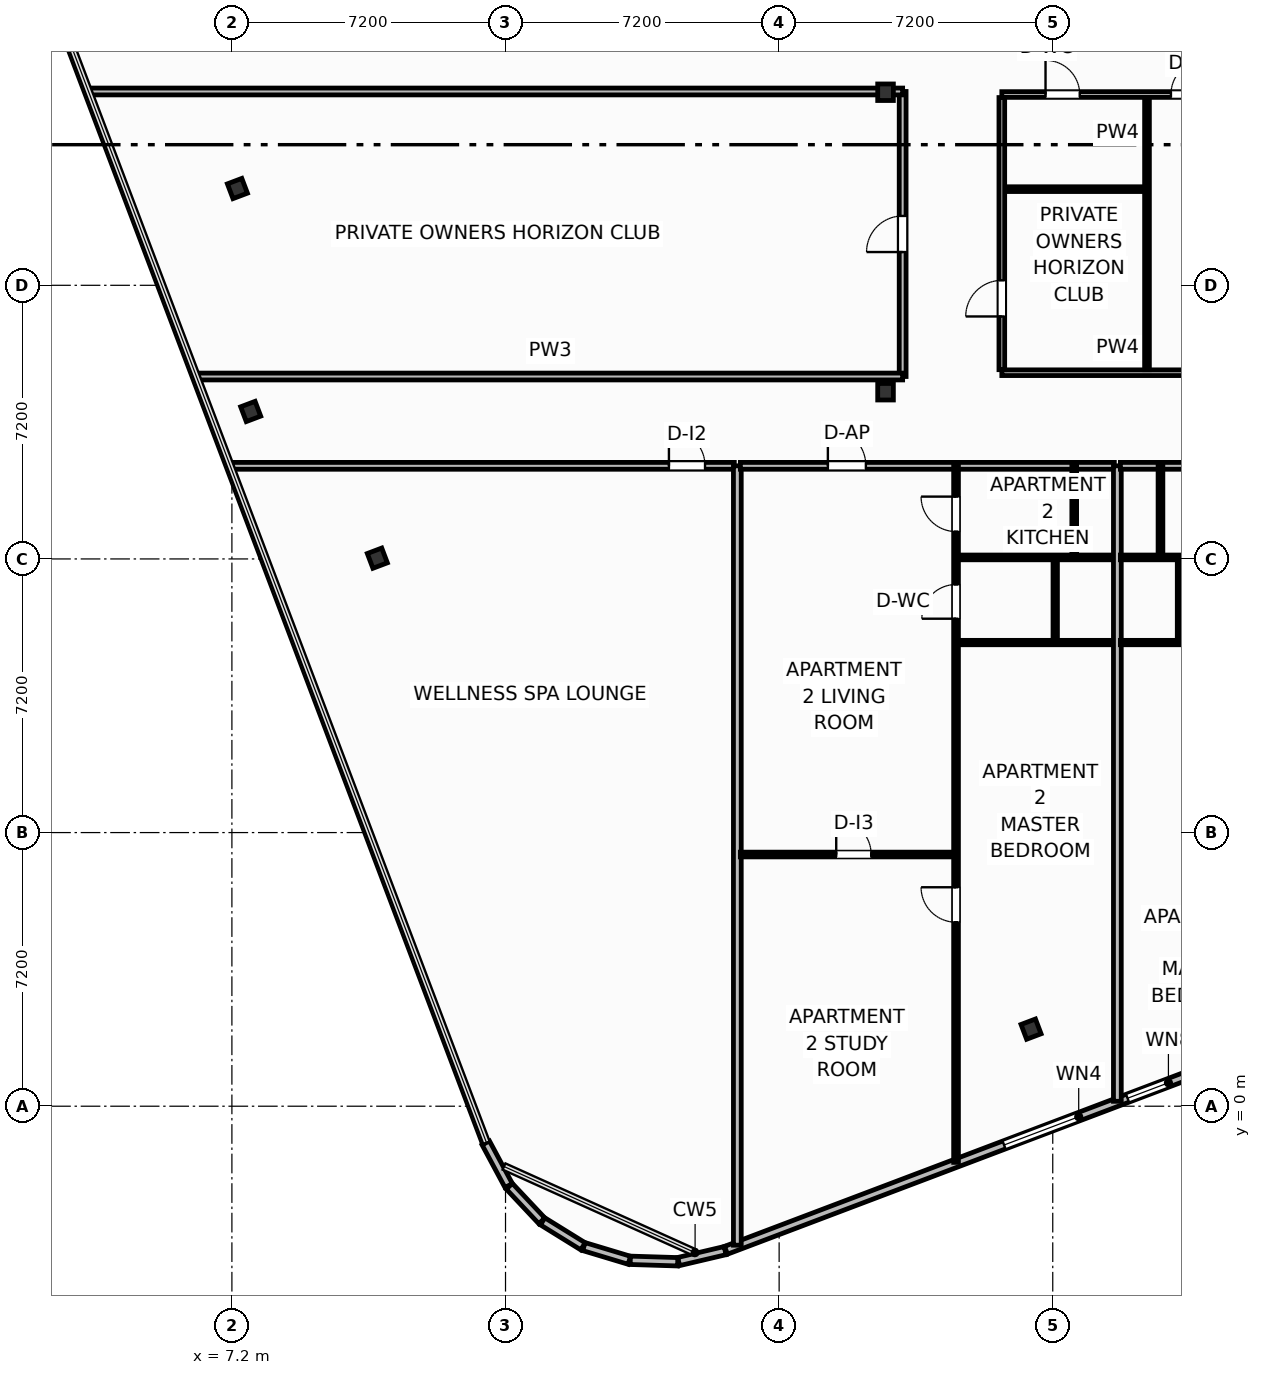
"""IFC4 building model, lengths in metres.
Left out: names, types, materials, properties, quantities, classifications, styles, units other than length and angle.
Written with IfcOpenShell. Run it as: python <this file> out.ifc"""

import sys

from ifc_helpers import new_model, si_unit, direction, frame, frame_2d, origin, origin_2d, place, context, subcontext, project, spatial, rectangle, i_section, extrude, element, fill, save


model = new_model("IFC4")
c1 = context("Model", 3, precision=1e-05, world=origin(), true_north=direction((0.0, 1.0)))
c2 = subcontext(c1, "Body", "Model", "MODEL_VIEW")
j1 = project(units=[si_unit("LENGTHUNIT", "METRE"), si_unit("PLANEANGLEUNIT", "RADIAN")], contexts=[c1])
p1 = place(None, origin())
s1 = spatial("IfcSite", under=j1, at=p1, CompositionType="ELEMENT")
p2 = place(p1, origin())
s2 = spatial("IfcBuilding", under=s1, at=p2, CompositionType="ELEMENT")
p3 = place(p2, frame((0.0, 0.0, 212.7)))
s3 = spatial("IfcBuildingStorey", under=s2, at=p3, CompositionType="ELEMENT", Elevation=212.7)
for number, where, z_axis, x_axis in (
    (1, (24.4, 18.8, 0.0), (0.0, 0.0, 1.0), (1.0, 0.0, 0.0)),
    (2, (24.4, 26.68, 0.0), (0.0, 0.0, 1.0), (1.0, 0.0, 0.0)),
):
    element("IfcColumn", number, at=place(p3, frame(where, z_axis=z_axis, x_axis=x_axis)), inside=s3, PredefinedType="COLUMN", context=c2, shape_type="SweptSolid", body=[
        extrude(i_section(OverallWidth=0.412, OverallDepth=0.435, WebThickness=0.036, FlangeThickness=0.057, FilletRadius=0.025, at=origin_2d()), origin(), (0.0, 0.0, 1.0), 3.7),
    ])
for number, where, z_axis, x_axis in (
    (3, (28.229, 2.028, 0.0), (0.0, 0.0, 1.0), (0.935, 0.354, 0.0)),
    (4, (7.345, 24.146, 0.0), (0.0, 0.0, 1.0), (0.935, 0.354, 0.0)),
    (5, (7.695, 18.281, 0.0), (0.0, 0.0, 1.0), (0.935, 0.354, 0.0)),
    (6, (11.027, 14.42, 0.0), (0.0, 0.0, 1.0), (0.935, 0.354, 0.0)),
):
    element("IfcColumn", number, at=place(p3, frame(where, z_axis=z_axis, x_axis=x_axis)), inside=s3, PredefinedType="COLUMN", context=c2, shape_type="SweptSolid", body=[
        extrude(i_section(OverallWidth=0.406, OverallDepth=0.416, WebThickness=0.03, FlangeThickness=0.048, FilletRadius=0.025, at=origin_2d()), origin(), (0.0, 0.0, 1.0), 3.7),
    ])
p4 = place(p3, frame((13.881, -0.966, 0.0), z_axis=(0.0, 0.0, 1.0), x_axis=(0.473242342135, -0.88093228208, 0.0)))
e7 = element("IfcWall", 7, at=p4, inside=s3, PredefinedType="SOLIDWALL", context=c2, shape_type="SweptSolid", body=[
    extrude(rectangle(XDim=1.274, YDim=0.22, at=frame_2d((0.637, 0.0))), origin(), (0.0, 0.0, 1.0), 2.73),
])
for number, where, z_axis, x_axis in (
    (8, (14.5, -2.106, 0.0), (0.0, 0.0, 1.0), (0.685, -0.729, 0.0)),
    (9, (15.377, -3.029, 0.0), (0.0, 0.0, 1.0), (0.85, -0.526, 0.0)),
    (10, (16.463, -3.694, 0.0), (0.0, 0.0, 1.0), (0.958, -0.288, 0.0)),
):
    element("IfcWall", number, at=place(p3, frame(where, z_axis=z_axis, x_axis=x_axis)), inside=s3, PredefinedType="SOLIDWALL", context=c2, shape_type="SweptSolid", body=[
        extrude(rectangle(XDim=1.249, YDim=0.22, at=frame_2d((0.624, 0.0))), origin(), (0.0, 0.0, 1.0), 2.73),
    ])
p5 = place(p3, frame((17.683, -4.055, 0.0), z_axis=(0.0, 0.0, 1.0), x_axis=(0.999522886512, -0.030886879732, 0.0)))
e11 = element("IfcWall", 11, at=p5, inside=s3, PredefinedType="SOLIDWALL", context=c2, shape_type="SweptSolid", body=[
    extrude(rectangle(XDim=1.249, YDim=0.22, at=frame_2d((0.625, 0.0))), origin(), (0.0, 0.0, 1.0), 2.73),
])
p6 = place(p3, frame((18.956, -4.087, 0.0), z_axis=(0.0, 0.0, 1.0), x_axis=(0.973463008152, 0.228844426981, 0.0)))
e12 = element("IfcWall", 12, at=p6, inside=s3, PredefinedType="SOLIDWALL", context=c2, shape_type="SweptSolid", body=[
    extrude(rectangle(XDim=1.257, YDim=0.22, at=frame_2d((0.628, 0.0))), origin(), (0.0, 0.0, 1.0), 2.73),
])
p7 = place(p3, frame((20.202, -3.791, 0.0), z_axis=(0.0, 0.0, 1.0), x_axis=(0.935225574232, 0.354052432984, 0.0)))
e13 = element("IfcWall", 13, at=p7, inside=s3, PredefinedType="SOLIDWALL", context=c2, shape_type="SweptSolid", body=[
    extrude(rectangle(XDim=17.747, YDim=0.22, at=frame_2d((8.874, 0.0))), origin(), (0.0, 0.0, 1.0), 2.73),
])
p8 = place(p7, frame((7.823, 0.0, 0.8)))
e14 = element("IfcOpeningElement", 14, at=p8, cuts=e13, PredefinedType="OPENING", context=c2, shape_type="SweptSolid", body=[
    extrude(rectangle(XDim=2.1, YDim=1.75, at=frame_2d((1.05, 0.875))), frame((0.0, 0.12, 0.0), z_axis=(0.0, -1.0, 0.0), x_axis=(1.0, 0.0, 0.0)), (0.0, 0.0, 1.0), 0.24),
])
p9 = place(p7, frame((11.298, 0.0, 0.8)))
e15 = element("IfcOpeningElement", 15, at=p9, cuts=e13, PredefinedType="OPENING", context=c2, shape_type="SweptSolid", body=[
    extrude(rectangle(XDim=1.15, YDim=1.4, at=frame_2d((0.575, 0.7))), frame((0.0, 0.12, 0.0), z_axis=(0.0, -1.0, 0.0), x_axis=(1.0, 0.0, 0.0)), (0.0, 0.0, 1.0), 0.24),
])
p10 = place(p3, frame((7.196, 16.85, 0.0), z_axis=(0.0, 0.0, 1.0), x_axis=(1.0, 0.0, 0.0)))
e16 = element("IfcWall", 16, at=p10, inside=s3, PredefinedType="PARTITIONING", context=c2, shape_type="SweptSolid", body=[
    extrude(rectangle(XDim=13.224, YDim=0.18, at=frame_2d((6.612, 0.0))), origin(), (0.0, 0.0, 1.0), 3.45),
])
p11 = place(p10, frame((11.504, 0.0, 0.0)))
e17 = element("IfcOpeningElement", 17, at=p11, cuts=e16, PredefinedType="OPENING", context=c2, shape_type="SweptSolid", body=[
    extrude(rectangle(XDim=0.95, YDim=2.05, at=frame_2d((0.475, 1.025))), frame((0.0, 0.1, 0.0), z_axis=(0.0, -1.0, 0.0), x_axis=(1.0, 0.0, 0.0)), (0.0, 0.0, 1.0), 0.2),
])
p12 = place(p3, frame((20.5, -3.657, 0.0), z_axis=(0.0, 0.0, 1.0), x_axis=(0.0, 1.0, 0.0)))
e18 = element("IfcWall", 18, at=p12, inside=s3, PredefinedType="PARTITIONING", context=c2, shape_type="SweptSolid", body=[
    extrude(rectangle(XDim=20.507, YDim=0.205, at=frame_2d((10.253, 0.0))), origin(), (0.0, 0.0, 1.0), 3.45),
])
p13 = place(p3, frame((20.58, 6.623, 0.0), z_axis=(0.0, 0.0, 1.0), x_axis=(1.0, 0.0, 0.0)))
e19 = element("IfcWall", 19, at=p13, inside=s3, PredefinedType="PARTITIONING", context=c2, shape_type="SweptSolid", body=[
    extrude(rectangle(XDim=5.605, YDim=0.125, at=frame_2d((2.803, 0.0))), origin(), (0.0, 0.0, 1.0), 3.45),
])
p14 = place(p13, frame((2.522, 0.0, 0.0)))
e20 = element("IfcOpeningElement", 20, at=p14, cuts=e19, PredefinedType="OPENING", context=c2, shape_type="SweptSolid", body=[
    extrude(rectangle(XDim=0.92, YDim=2.05, at=frame_2d((0.46, 1.025))), frame((0.0, 0.073, 0.0), z_axis=(0.0, -1.0, 0.0), x_axis=(1.0, 0.0, 0.0)), (0.0, 0.0, 1.0), 0.145),
])
p15 = place(p3, frame((20.58, 16.85, 0.0), z_axis=(0.0, 0.0, 1.0), x_axis=(1.0, 0.0, 0.0)))
e21 = element("IfcWall", 21, at=p15, inside=s3, PredefinedType="PARTITIONING", context=c2, shape_type="SweptSolid", body=[
    extrude(rectangle(XDim=9.84, YDim=0.18, at=frame_2d((4.92, 0.0))), origin(), (0.0, 0.0, 1.0), 3.45),
])
p16 = place(p15, frame((2.302, 0.0, 0.0)))
e22 = element("IfcOpeningElement", 22, at=p16, cuts=e21, PredefinedType="OPENING", context=c2, shape_type="SweptSolid", body=[
    extrude(rectangle(XDim=1.0, YDim=2.2, at=frame_2d((0.5, 1.1))), frame((0.0, 0.1, 0.0), z_axis=(0.0, -1.0, 0.0), x_axis=(1.0, 0.0, 0.0)), (0.0, 0.0, 1.0), 0.2),
])
p17 = place(p3, frame((26.255, -1.478, 0.0), z_axis=(0.0, 0.0, 1.0), x_axis=(0.0, 1.0, 0.0)))
e23 = element("IfcWall", 23, at=p17, inside=s3, PredefinedType="PARTITIONING", context=c2, shape_type="SweptSolid", body=[
    extrude(rectangle(XDim=18.328, YDim=0.125, at=frame_2d((9.164, 0.0))), origin(), (0.0, 0.0, 1.0), 2.739),
])
p18 = place(p17, frame((6.319, 0.0, 0.0)))
e24 = element("IfcOpeningElement", 24, at=p18, cuts=e23, PredefinedType="OPENING", context=c2, shape_type="SweptSolid", body=[
    extrude(rectangle(XDim=0.92, YDim=2.05, at=frame_2d((0.46, 1.025))), frame((0.0, 0.073, 0.0), z_axis=(0.0, -1.0, 0.0), x_axis=(1.0, 0.0, 0.0)), (0.0, 0.0, 1.0), 0.145),
])
p19 = place(p17, frame((14.305, 0.0, 0.0)))
e25 = element("IfcOpeningElement", 25, at=p19, cuts=e23, PredefinedType="OPENING", context=c2, shape_type="SweptSolid", body=[
    extrude(rectangle(XDim=0.9, YDim=2.05, at=frame_2d((0.45, 1.025))), frame((0.0, 0.073, 0.0), z_axis=(0.0, -1.0, 0.0), x_axis=(1.0, 0.0, 0.0)), (0.0, 0.0, 1.0), 0.145),
])
p20 = place(p17, frame((16.598, 0.0, 0.0)))
e26 = element("IfcOpeningElement", 26, at=p20, cuts=e23, PredefinedType="OPENING", context=c2, shape_type="SweptSolid", body=[
    extrude(rectangle(XDim=0.92, YDim=2.05, at=frame_2d((0.46, 1.025))), frame((0.0, 0.073, 0.0), z_axis=(0.0, -1.0, 0.0), x_axis=(1.0, 0.0, 0.0)), (0.0, 0.0, 1.0), 0.145),
])
p21 = place(p3, frame((26.325, 14.44, 0.0), z_axis=(0.0, 0.0, 1.0), x_axis=(1.0, 0.0, 0.0)))
e27 = element("IfcWall", 27, at=p21, inside=s3, PredefinedType="PARTITIONING", context=c2, shape_type="SweptSolid", body=[
    extrude(rectangle(XDim=4.095, YDim=0.125, at=frame_2d((2.047, 0.0))), origin(), (0.0, 0.0, 1.0), 3.45),
])
p22 = place(p3, frame((26.325, 12.2, 0.0), z_axis=(0.0, 0.0, 1.0), x_axis=(1.0, 0.0, 0.0)))
e28 = element("IfcWall", 28, at=p22, inside=s3, PredefinedType="PARTITIONING", context=c2, shape_type="SweptSolid", body=[
    extrude(rectangle(XDim=4.095, YDim=0.115, at=frame_2d((2.047, 0.0))), origin(), (0.0, 0.0, 1.0), 3.45),
])
p23 = place(p3, frame((29.365, 14.44, 0.0), z_axis=(0.0, 0.0, 1.0), x_axis=(0.0, 1.0, 0.0)))
e29 = element("IfcWall", 29, at=p23, inside=s3, PredefinedType="PARTITIONING", context=c2, shape_type="SweptSolid", body=[
    extrude(rectangle(XDim=2.41, YDim=0.125, at=frame_2d((1.205, 0.0))), origin(), (0.0, 0.0, 1.0), 3.45),
])
p24 = place(p3, frame((28.865, 12.2, 0.0), z_axis=(0.0, 0.0, 1.0), x_axis=(0.0, 1.0, 0.0)))
e30 = element("IfcWall", 30, at=p24, inside=s3, PredefinedType="PARTITIONING", context=c2, shape_type="SweptSolid", body=[
    extrude(rectangle(XDim=2.24, YDim=0.115, at=frame_2d((1.12, 0.0))), origin(), (0.0, 0.0, 1.0), 3.45),
])
p25 = place(p3, frame((30.5, 0.129, 0.0), z_axis=(0.0, 0.0, 1.0), x_axis=(0.0, 1.0, 0.0)))
e31 = element("IfcWall", 31, at=p25, inside=s3, PredefinedType="PARTITIONING", context=c2, shape_type="SweptSolid", body=[
    extrude(rectangle(XDim=16.721, YDim=0.205, at=frame_2d((8.36, 0.0))), origin(), (0.0, 0.0, 1.0), 3.45),
])
p26 = place(p3, frame((30.58, 16.85, 0.0), z_axis=(0.0, 0.0, 1.0), x_axis=(1.0, 0.0, 0.0)))
e32 = element("IfcWall", 32, at=p26, inside=s3, PredefinedType="PARTITIONING", context=c2, shape_type="SweptSolid", body=[
    extrude(rectangle(XDim=9.84, YDim=0.18, at=frame_2d((4.92, 0.0))), origin(), (0.0, 0.0, 1.0), 3.45),
])
p27 = place(p26, frame((6.537, 0.0, 0.0)))
e33 = element("IfcOpeningElement", 33, at=p27, cuts=e32, PredefinedType="OPENING", context=c2, shape_type="SweptSolid", body=[
    extrude(rectangle(XDim=1.0, YDim=2.2, at=frame_2d((0.5, 1.1))), frame((0.0, 0.1, 0.0), z_axis=(0.0, -1.0, 0.0), x_axis=(1.0, 0.0, 0.0)), (0.0, 0.0, 1.0), 0.2),
])
p28 = place(p3, frame((30.58, 14.44, 0.0), z_axis=(0.0, 0.0, 1.0), x_axis=(1.0, 0.0, 0.0)))
e34 = element("IfcWall", 34, at=p28, inside=s3, PredefinedType="PARTITIONING", context=c2, shape_type="SweptSolid", body=[
    extrude(rectangle(XDim=4.095, YDim=0.125, at=frame_2d((2.047, 0.0))), origin(), (0.0, 0.0, 1.0), 3.45),
])
p29 = place(p3, frame((30.58, 12.2, 0.0), z_axis=(0.0, 0.0, 1.0), x_axis=(1.0, 0.0, 0.0)))
e35 = element("IfcWall", 35, at=p29, inside=s3, PredefinedType="PARTITIONING", context=c2, shape_type="SweptSolid", body=[
    extrude(rectangle(XDim=4.095, YDim=0.115, at=frame_2d((2.047, 0.0))), origin(), (0.0, 0.0, 1.0), 3.45),
])
p30 = place(p3, frame((31.635, 14.44, 0.0), z_axis=(0.0, 0.0, 1.0), x_axis=(0.0, 1.0, 0.0)))
e36 = element("IfcWall", 36, at=p30, inside=s3, PredefinedType="PARTITIONING", context=c2, shape_type="SweptSolid", body=[
    extrude(rectangle(XDim=2.41, YDim=0.125, at=frame_2d((1.205, 0.0))), origin(), (0.0, 0.0, 1.0), 3.45),
])
p31 = place(p3, frame((32.135, 12.2, 0.0), z_axis=(0.0, 0.0, 1.0), x_axis=(0.0, 1.0, 0.0)))
e37 = element("IfcWall", 37, at=p31, inside=s3, PredefinedType="PARTITIONING", context=c2, shape_type="SweptSolid", body=[
    extrude(rectangle(XDim=2.24, YDim=0.115, at=frame_2d((1.12, 0.0))), origin(), (0.0, 0.0, 1.0), 3.45),
])
p32 = place(p3, frame((24.85, 19.2, 0.0), z_axis=(0.0, 0.0, 1.0), x_axis=(0.0, 1.0, 0.0)))
e38 = element("IfcWall", 38, at=p32, inside=s3, PredefinedType="PARTITIONING", context=c2, shape_type="SweptSolid", body=[
    extrude(rectangle(XDim=7.5, YDim=0.18, at=frame_2d((3.75, 0.0))), origin(), (0.0, 0.0, 1.0), 3.45),
])
p33 = place(p32, frame((3.275, 0.0, 0.0)))
e39 = element("IfcOpeningElement", 39, at=p33, cuts=e38, PredefinedType="OPENING", context=c2, shape_type="SweptSolid", body=[
    extrude(rectangle(XDim=0.95, YDim=2.05, at=frame_2d((0.475, 1.025))), frame((0.0, 0.1, 0.0), z_axis=(0.0, -1.0, 0.0), x_axis=(1.0, 0.0, 0.0)), (0.0, 0.0, 1.0), 0.2),
])
p34 = place(p3, frame((6.306, 19.2, 0.0), z_axis=(0.0, 0.0, 1.0), x_axis=(1.0, 0.0, 0.0)))
e40 = element("IfcWall", 40, at=p34, inside=s3, PredefinedType="PARTITIONING", context=c2, shape_type="SweptSolid", body=[
    extrude(rectangle(XDim=18.544, YDim=0.18, at=frame_2d((9.272, 0.0))), origin(), (0.0, 0.0, 1.0), 3.45),
])
p35 = place(p3, frame((3.467, 26.7, 0.0), z_axis=(0.0, 0.0, 1.0), x_axis=(1.0, 0.0, 0.0)))
e41 = element("IfcWall", 41, at=p35, inside=s3, PredefinedType="PARTITIONING", context=c2, shape_type="SweptSolid", body=[
    extrude(rectangle(XDim=21.383, YDim=0.18, at=frame_2d((10.691, 0.0))), origin(), (0.0, 0.0, 1.0), 2.662),
])
p36 = place(p3, frame((27.46, 19.3, 0.0), z_axis=(0.0, 0.0, 1.0), x_axis=(1.0, 0.0, 0.0)))
e42 = element("IfcWall", 42, at=p36, inside=s3, PredefinedType="PARTITIONING", context=c2, shape_type="SweptSolid", body=[
    extrude(rectangle(XDim=6.1, YDim=0.15, at=frame_2d((3.05, 0.0))), origin(), (0.0, 0.0, 1.0), 2.662),
])
p37 = place(p3, frame((27.46, 26.62, 0.0), z_axis=(0.0, 0.0, 1.0), x_axis=(1.0, 0.0, 0.0)))
e43 = element("IfcWall", 43, at=p37, inside=s3, PredefinedType="PARTITIONING", context=c2, shape_type="SweptSolid", body=[
    extrude(rectangle(XDim=6.1, YDim=0.15, at=frame_2d((3.05, 0.0))), origin(), (0.0, 0.0, 1.0), 2.662),
])
p38 = place(p37, frame((1.15, 0.0, 0.0)))
e44 = element("IfcOpeningElement", 44, at=p38, cuts=e43, PredefinedType="OPENING", context=c2, shape_type="SweptSolid", body=[
    extrude(rectangle(XDim=0.9, YDim=2.05, at=frame_2d((0.45, 1.025))), frame((0.0, 0.085, 0.0), z_axis=(0.0, -1.0, 0.0), x_axis=(1.0, 0.0, 0.0)), (0.0, 0.0, 1.0), 0.17),
])
p39 = place(p37, frame((4.45, 0.0, 0.0)))
e45 = element("IfcOpeningElement", 45, at=p39, cuts=e43, PredefinedType="OPENING", context=c2, shape_type="SweptSolid", body=[
    extrude(rectangle(XDim=0.92, YDim=2.05, at=frame_2d((0.46, 1.025))), frame((0.0, 0.085, 0.0), z_axis=(0.0, -1.0, 0.0), x_axis=(1.0, 0.0, 0.0)), (0.0, 0.0, 1.0), 0.17),
])
p40 = place(p3, frame((31.28, 19.38, 0.0), z_axis=(0.0, 0.0, 1.0), x_axis=(0.0, 1.0, 0.0)))
e46 = element("IfcWall", 46, at=p40, inside=s3, PredefinedType="PARTITIONING", context=c2, shape_type="SweptSolid", body=[
    extrude(rectangle(XDim=7.16, YDim=0.125, at=frame_2d((3.58, 0.0))), origin(), (0.0, 0.0, 1.0), 3.45),
])
p41 = place(p3, frame((27.52, 24.13, 0.0), z_axis=(0.0, 0.0, 1.0), x_axis=(1.0, 0.0, 0.0)))
e47 = element("IfcWall", 47, at=p41, inside=s3, PredefinedType="PARTITIONING", context=c2, shape_type="SweptSolid", body=[
    extrude(rectangle(XDim=3.7, YDim=0.125, at=frame_2d((1.85, 0.0))), origin(), (0.0, 0.0, 1.0), 3.45),
])
p42 = place(p3, frame((27.46, 19.38, 0.0), z_axis=(0.0, 0.0, 1.0), x_axis=(0.0, 1.0, 0.0)))
e48 = element("IfcWall", 48, at=p42, inside=s3, PredefinedType="PARTITIONING", context=c2, shape_type="SweptSolid", body=[
    extrude(rectangle(XDim=7.16, YDim=0.15, at=frame_2d((3.58, 0.0))), origin(), (0.0, 0.0, 1.0), 3.45),
])
p43 = place(p42, frame((1.4, 0.0, 0.0)))
e49 = element("IfcOpeningElement", 49, at=p43, cuts=e48, PredefinedType="OPENING", context=c2, shape_type="SweptSolid", body=[
    extrude(rectangle(XDim=0.95, YDim=2.05, at=frame_2d((0.475, 1.025))), frame((0.0, 0.085, 0.0), z_axis=(0.0, -1.0, 0.0), x_axis=(1.0, 0.0, 0.0)), (0.0, 0.0, 1.0), 0.17),
])
p44 = place(p8, origin())
e50 = element("IfcWindow", 50, at=p44, inside=s3, PartitioningType="SINGLE_PANEL", PredefinedType="WINDOW", context=c2, shape_type="SweptSolid", body=[
    extrude(rectangle(XDim=2.1, YDim=1.75, at=frame_2d((1.05, 0.875))), frame((0.0, 0.03, 0.0), z_axis=(0.0, -1.0, 0.0), x_axis=(1.0, 0.0, 0.0)), (0.0, 0.0, 1.0), 0.06),
])
fill(e14, e50)
p45 = place(p11, origin())
e51 = element("IfcDoor", 51, at=p45, inside=s3, OperationType="SINGLE_SWING_LEFT", PredefinedType="DOOR", context=c2, shape_type="SweptSolid", body=[
    extrude(rectangle(XDim=0.95, YDim=2.05, at=frame_2d((0.475, 1.025))), frame((0.0, 0.025, 0.0), z_axis=(0.0, -1.0, 0.0), x_axis=(1.0, 0.0, 0.0)), (0.0, 0.0, 1.0), 0.05),
])
fill(e17, e51)
p46 = place(p14, origin())
e52 = element("IfcDoor", 52, at=p46, inside=s3, OperationType="SINGLE_SWING_LEFT", PredefinedType="DOOR", context=c2, shape_type="SweptSolid", body=[
    extrude(rectangle(XDim=0.92, YDim=2.05, at=frame_2d((0.46, 1.025))), frame((0.0, 0.025, 0.0), z_axis=(0.0, -1.0, 0.0), x_axis=(1.0, 0.0, 0.0)), (0.0, 0.0, 1.0), 0.05),
])
fill(e20, e52)
p47 = place(p16, origin())
e53 = element("IfcDoor", 53, at=p47, inside=s3, OperationType="SINGLE_SWING_LEFT", PredefinedType="DOOR", context=c2, shape_type="SweptSolid", body=[
    extrude(rectangle(XDim=1.0, YDim=2.2, at=frame_2d((0.5, 1.1))), frame((0.0, 0.025, 0.0), z_axis=(0.0, -1.0, 0.0), x_axis=(1.0, 0.0, 0.0)), (0.0, 0.0, 1.0), 0.05),
])
fill(e22, e53)
p48 = place(p18, origin())
e54 = element("IfcDoor", 54, at=p48, inside=s3, OperationType="SINGLE_SWING_RIGHT", PredefinedType="DOOR", context=c2, shape_type="SweptSolid", body=[
    extrude(rectangle(XDim=0.92, YDim=2.05, at=frame_2d((0.46, 1.025))), frame((0.0, 0.025, 0.0), z_axis=(0.0, -1.0, 0.0), x_axis=(1.0, 0.0, 0.0)), (0.0, 0.0, 1.0), 0.05),
])
fill(e24, e54)
p49 = place(p19, origin())
e55 = element("IfcDoor", 55, at=p49, inside=s3, OperationType="SINGLE_SWING_LEFT", PredefinedType="DOOR", context=c2, shape_type="SweptSolid", body=[
    extrude(rectangle(XDim=0.9, YDim=2.05, at=frame_2d((0.45, 1.025))), frame((0.0, 0.025, 0.0), z_axis=(0.0, -1.0, 0.0), x_axis=(1.0, 0.0, 0.0)), (0.0, 0.0, 1.0), 0.05),
])
fill(e25, e55)
p50 = place(p20, origin())
e56 = element("IfcDoor", 56, at=p50, inside=s3, OperationType="SINGLE_SWING_RIGHT", PredefinedType="DOOR", context=c2, shape_type="SweptSolid", body=[
    extrude(rectangle(XDim=0.92, YDim=2.05, at=frame_2d((0.46, 1.025))), frame((0.0, 0.025, 0.0), z_axis=(0.0, -1.0, 0.0), x_axis=(1.0, 0.0, 0.0)), (0.0, 0.0, 1.0), 0.05),
])
fill(e26, e56)
p51 = place(p33, origin())
e57 = element("IfcDoor", 57, at=p51, inside=s3, OperationType="SINGLE_SWING_LEFT", PredefinedType="DOOR", context=c2, shape_type="SweptSolid", body=[
    extrude(rectangle(XDim=0.95, YDim=2.05, at=frame_2d((0.475, 1.025))), frame((0.0, 0.025, 0.0), z_axis=(0.0, -1.0, 0.0), x_axis=(1.0, 0.0, 0.0)), (0.0, 0.0, 1.0), 0.05),
])
fill(e39, e57)
p52 = place(p38, origin())
e58 = element("IfcDoor", 58, at=p52, inside=s3, OperationType="SINGLE_SWING_LEFT", PredefinedType="DOOR", context=c2, shape_type="SweptSolid", body=[
    extrude(rectangle(XDim=0.9, YDim=2.05, at=frame_2d((0.45, 1.025))), frame((0.0, 0.025, 0.0), z_axis=(0.0, -1.0, 0.0), x_axis=(1.0, 0.0, 0.0)), (0.0, 0.0, 1.0), 0.05),
])
fill(e44, e58)
p53 = place(p39, origin())
e59 = element("IfcDoor", 59, at=p53, inside=s3, OperationType="SINGLE_SWING_RIGHT", PredefinedType="DOOR", context=c2, shape_type="SweptSolid", body=[
    extrude(rectangle(XDim=0.92, YDim=2.05, at=frame_2d((0.46, 1.025))), frame((0.0, 0.025, 0.0), z_axis=(0.0, -1.0, 0.0), x_axis=(1.0, 0.0, 0.0)), (0.0, 0.0, 1.0), 0.05),
])
fill(e45, e59)
p54 = place(p43, origin())
e60 = element("IfcDoor", 60, at=p54, inside=s3, OperationType="SINGLE_SWING_LEFT", PredefinedType="DOOR", context=c2, shape_type="SweptSolid", body=[
    extrude(rectangle(XDim=0.95, YDim=2.05, at=frame_2d((0.475, 1.025))), frame((0.0, 0.025, 0.0), z_axis=(0.0, -1.0, 0.0), x_axis=(1.0, 0.0, 0.0)), (0.0, 0.0, 1.0), 0.05),
])
fill(e49, e60)
p55 = place(p9, origin())
e61 = element("IfcWindow", 61, at=p55, inside=s3, PartitioningType="SINGLE_PANEL", PredefinedType="WINDOW", context=c2, shape_type="SweptSolid", body=[
    extrude(rectangle(XDim=1.15, YDim=1.4, at=frame_2d((0.575, 0.7))), frame((0.0, 0.03, 0.0), z_axis=(0.0, -1.0, 0.0), x_axis=(1.0, 0.0, 0.0)), (0.0, 0.0, 1.0), 0.06),
])
fill(e15, e61)
save(model, sys.argv[1])
